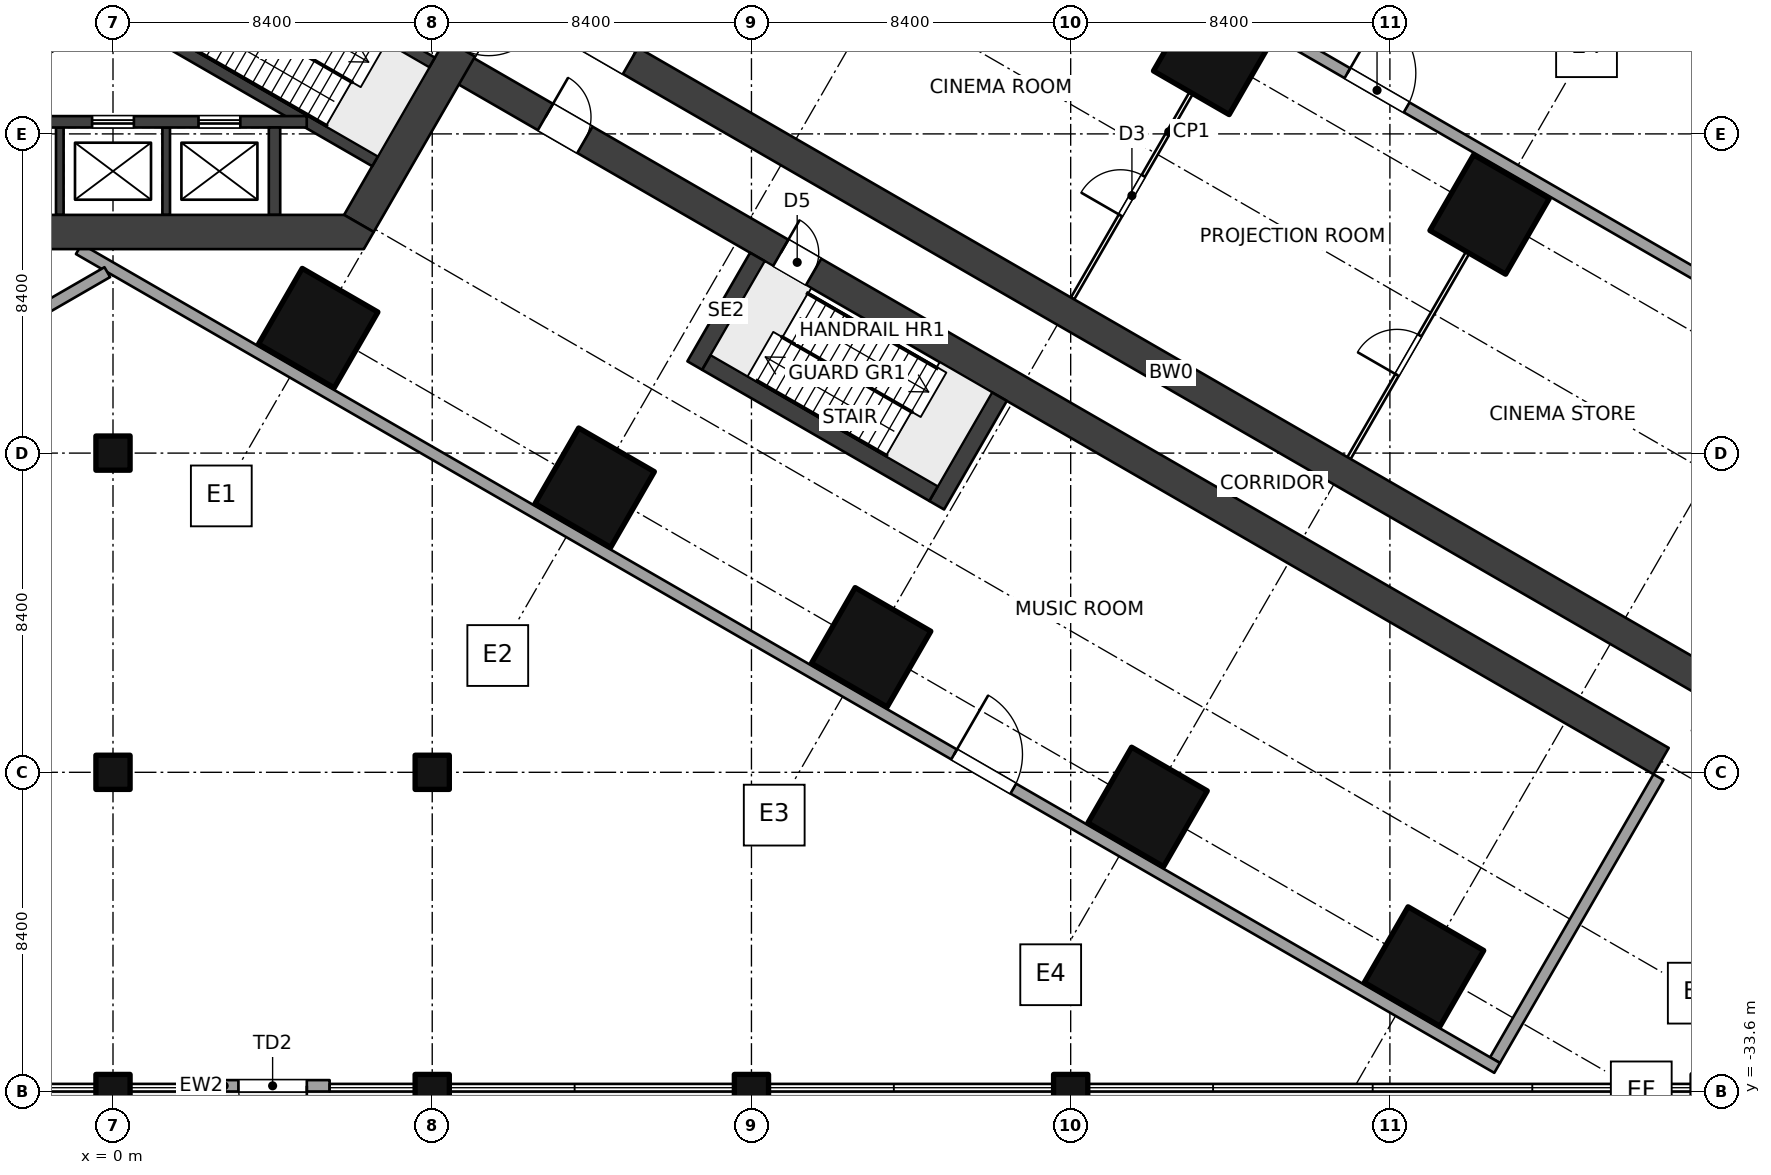
"""IFC4 building model, lengths in metres.
Left out: names, types, materials, properties, quantities, classifications, styles, units other than length and angle.
Written with IfcOpenShell. Run it as: python <this file> out.ifc"""

import sys

from ifc_helpers import new_model, si_unit, direction, frame, frame_2d, origin, origin_2d, place, context, subcontext, project, spatial, polyline, rectangle, outline, extrude, element, fill, save


model = new_model("IFC4")
c1 = context("Model", 3, precision=1e-05, world=origin(), true_north=direction((0.0, 1.0)))
c2 = subcontext(c1, "Body", "Model", "MODEL_VIEW")
j1 = project(units=[si_unit("LENGTHUNIT", "METRE"), si_unit("PLANEANGLEUNIT", "RADIAN")], contexts=[c1])
p1 = place(None, origin())
s1 = spatial("IfcSite", under=j1, at=p1, CompositionType="ELEMENT")
p2 = place(p1, origin())
s2 = spatial("IfcBuilding", under=s1, at=p2, CompositionType="ELEMENT")
p3 = place(p2, frame((0.0, 0.0, 6.0)))
s3 = spatial("IfcBuildingStorey", under=s2, at=p3, CompositionType="ELEMENT", Elevation=6.0)
for number, where, z_axis, x_axis in (
    (1, (5.4, -13.51, 0.0), (0.0, 0.0, 1.0), (-0.5, -0.866, 0.0)),
    (2, (12.675, -17.71, 0.0), (0.0, 0.0, 1.0), (-0.5, -0.866, 0.0)),
    (3, (28.949, -6.322, 0.0), (0.0, 0.0, 1.0), (-0.5, -0.866, 0.0)),
    (4, (19.949, -21.91, 0.0), (0.0, 0.0, 1.0), (-0.5, -0.866, 0.0)),
    (5, (36.224, -10.521, 0.0), (0.0, 0.0, 1.0), (-0.5, -0.866, 0.0)),
    (6, (27.224, -26.11, 0.0), (0.0, 0.0, 1.0), (-0.5, -0.866, 0.0)),
    (7, (34.499, -30.31, 0.0), (0.0, 0.0, 1.0), (-0.5, -0.866, 0.0)),
):
    element("IfcColumn", number, at=place(p3, frame(where, z_axis=z_axis, x_axis=x_axis)), inside=s3, PredefinedType="COLUMN", context=c2, shape_type="SweptSolid", body=[
        extrude(rectangle(XDim=2.3, YDim=2.3, at=origin_2d()), origin(), (0.0, 0.0, 1.0), 5.0),
    ])
for number, where, z_axis, x_axis in (
    (8, (0.0, -33.6, 0.0), (0.0, 0.0, 1.0), (1.0, 0.0, 0.0)),
    (9, (0.0, -25.2, 0.0), (0.0, 0.0, 1.0), (1.0, 0.0, 0.0)),
    (10, (0.0, -16.8, 0.0), (0.0, 0.0, 1.0), (1.0, 0.0, 0.0)),
    (11, (8.4, -33.6, 0.0), (0.0, 0.0, 1.0), (1.0, 0.0, 0.0)),
    (12, (8.4, -25.2, 0.0), (0.0, 0.0, 1.0), (1.0, 0.0, 0.0)),
    (13, (16.8, -33.6, 0.0), (0.0, 0.0, 1.0), (1.0, 0.0, 0.0)),
    (14, (25.2, -33.6, 0.0), (0.0, 0.0, 1.0), (1.0, 0.0, 0.0)),
):
    element("IfcColumn", number, at=place(p3, frame(where, z_axis=z_axis, x_axis=x_axis)), inside=s3, PredefinedType="COLUMN", context=c2, shape_type="SweptSolid", body=[
        extrude(rectangle(XDim=0.9, YDim=0.9, at=origin_2d()), origin(), (0.0, 0.0, 1.0), 5.0),
    ])
p4 = place(p3, frame((12.551, -0.225, 0.0), z_axis=(0.0, 0.0, 1.0), x_axis=(-0.499997612506, -0.8660267822, 0.0)))
e15 = element("IfcWall", 15, at=p4, inside=s3, PredefinedType="SHEAR", context=c2, shape_type="SweptSolid", body=[
    extrude(rectangle(XDim=12.161, YDim=0.9, at=frame_2d((6.08, 0.0))), origin(), (0.0, 0.0, 1.0), 5.0),
])
p5 = place(p4, frame((5.33, 0.0, 0.0)))
e16 = element("IfcOpeningElement", 16, at=p5, cuts=e15, PredefinedType="OPENING", context=c2, shape_type="SweptSolid", body=[
    extrude(rectangle(XDim=1.5, YDim=2.1, at=frame_2d((0.75, 1.05))), frame((0.0, 0.46, 0.0), z_axis=(0.0, -1.0, 0.0), x_axis=(1.0, 0.0, 0.0)), (0.0, 0.0, 1.0), 0.92),
])
p6 = place(p3, origin())
e17 = element("IfcWall", 17, at=p6, inside=s3, PredefinedType="SHEAR", context=c2, shape_type="SweptSolid", body=[
    extrude(outline(polyline([(-6.6, -11.432), (6.6, -11.432), (6.86, -10.981), (6.08, -10.531), (-6.08, -10.531), (-6.86, -10.981), (-6.6, -11.432)])), origin(), (0.0, 0.0, 1.0), 5.0),
])
p7 = place(p3, frame((-0.919, -5.669, 0.0), z_axis=(0.0, 0.0, 1.0), x_axis=(-0.866011800373, -0.500023561059, 0.0)))
e18 = element("IfcWall", 18, at=p7, inside=s3, PredefinedType="SHEAR", context=c2, shape_type="SweptSolid", body=[
    extrude(rectangle(XDim=6.902, YDim=0.3, at=frame_2d((3.451, 0.0))), origin(), (0.0, 0.0, 1.0), 5.0),
])
p8 = place(p3, frame((2.419, -3.071, 0.0), z_axis=(0.0, 0.0, 1.0), x_axis=(0.86602711848, -0.499997030048, 0.0)))
e19 = element("IfcWall", 19, at=p8, inside=s3, PredefinedType="SHEAR", context=c2, shape_type="SweptSolid", body=[
    extrude(rectangle(XDim=6.901, YDim=0.3, at=frame_2d((3.451, 0.0))), origin(), (0.0, 0.0, 1.0), 5.0),
])
p9 = place(p8, frame((0.25, 0.0, 0.0)))
e20 = element("IfcOpeningElement", 20, at=p9, cuts=e19, PredefinedType="OPENING", context=c2, shape_type="SweptSolid", body=[
    extrude(rectangle(XDim=1.0, YDim=2.1, at=frame_2d((0.5, 1.05))), frame((0.0, 0.16, 0.0), z_axis=(0.0, -1.0, 0.0), x_axis=(1.0, 0.0, 0.0)), (0.0, 0.0, 1.0), 0.32),
])
p10 = place(p3, frame((0.919, -5.669, 0.0), z_axis=(0.0, 0.0, 1.0), x_axis=(0.866011800373, -0.500023561059, 0.0)))
e21 = element("IfcWall", 21, at=p10, inside=s3, PredefinedType="SHEAR", context=c2, shape_type="SweptSolid", body=[
    extrude(rectangle(XDim=6.902, YDim=0.3, at=frame_2d((3.451, 0.0))), origin(), (0.0, 0.0, 1.0), 5.0),
])
p11 = place(p3, frame((5.098, -8.082, 0.0), z_axis=(0.0, 0.0, 1.0), x_axis=(-1.0, 0.0, 0.0)))
e22 = element("IfcWall", 22, at=p11, inside=s3, PredefinedType="SHEAR", context=c2, shape_type="SweptSolid", body=[
    extrude(rectangle(XDim=10.195, YDim=0.3, at=frame_2d((5.098, 0.0))), origin(), (0.0, 0.0, 1.0), 5.0),
])
p12 = place(p11, frame((1.748, 0.0, 0.0)))
e23 = element("IfcOpeningElement", 23, at=p12, cuts=e22, PredefinedType="OPENING", context=c2, shape_type="SweptSolid", body=[
    extrude(rectangle(XDim=1.1, YDim=2.1, at=frame_2d((0.55, 1.05))), frame((0.0, 0.16, 0.0), z_axis=(0.0, -1.0, 0.0), x_axis=(1.0, 0.0, 0.0)), (0.0, 0.0, 1.0), 0.32),
])
p13 = place(p11, frame((4.548, 0.0, 0.0)))
e24 = element("IfcOpeningElement", 24, at=p13, cuts=e22, PredefinedType="OPENING", context=c2, shape_type="SweptSolid", body=[
    extrude(rectangle(XDim=1.1, YDim=2.1, at=frame_2d((0.55, 1.05))), frame((0.0, 0.16, 0.0), z_axis=(0.0, -1.0, 0.0), x_axis=(1.0, 0.0, 0.0)), (0.0, 0.0, 1.0), 0.32),
])
p14 = place(p11, frame((7.348, 0.0, 0.0)))
e25 = element("IfcOpeningElement", 25, at=p14, cuts=e22, PredefinedType="OPENING", context=c2, shape_type="SweptSolid", body=[
    extrude(rectangle(XDim=1.1, YDim=2.1, at=frame_2d((0.55, 1.05))), frame((0.0, 0.16, 0.0), z_axis=(0.0, -1.0, 0.0), x_axis=(1.0, 0.0, 0.0)), (0.0, 0.0, 1.0), 0.32),
])
p15 = place(p3, frame((4.25, -8.231, 0.0), z_axis=(0.0, 0.0, 1.0), x_axis=(0.0, -1.0, 0.0)))
e26 = element("IfcWall", 26, at=p15, inside=s3, PredefinedType="SHEAR", context=c2, shape_type="SweptSolid", body=[
    extrude(rectangle(XDim=2.3, YDim=0.3, at=frame_2d((1.15, 0.0))), origin(), (0.0, 0.0, 1.0), 5.0),
])
for number, where, z_axis, x_axis in (
    (27, (1.4, -8.231, 0.0), (0.0, 0.0, 1.0), (0.0, -1.0, 0.0)),
    (28, (-1.4, -8.231, 0.0), (0.0, 0.0, 1.0), (0.0, -1.0, 0.0)),
):
    element("IfcWall", number, at=place(p3, frame(where, z_axis=z_axis, x_axis=x_axis)), inside=s3, PredefinedType="SHEAR", context=c2, shape_type="SweptSolid", body=[
        extrude(rectangle(XDim=2.3, YDim=0.2, at=frame_2d((1.15, 0.0))), origin(), (0.0, 0.0, 1.0), 5.0),
    ])
p16 = place(p3, frame((10.11, -4.451, 0.0), z_axis=(0.0, 0.0, 1.0), x_axis=(0.866025284237, -0.500000207062, 0.0)))
e29 = element("IfcWall", 29, at=p16, inside=s3, PredefinedType="SHEAR", context=c2, shape_type="SweptSolid", body=[
    extrude(rectangle(XDim=36.75, YDim=0.8, at=frame_2d((18.375, 0.0))), origin(), (0.0, 0.0, 1.0), 5.0),
])
p17 = place(p16, frame((2.85, 0.0, 0.0)))
e30 = element("IfcOpeningElement", 30, at=p17, cuts=e29, PredefinedType="OPENING", context=c2, shape_type="SweptSolid", body=[
    extrude(rectangle(XDim=1.2, YDim=2.1, at=frame_2d((0.6, 1.05))), frame((0.0, 0.41, 0.0), z_axis=(0.0, -1.0, 0.0), x_axis=(1.0, 0.0, 0.0)), (0.0, 0.0, 1.0), 0.82),
])
p18 = place(p3, frame((8.91, -6.53, 0.0), z_axis=(0.0, 0.0, 1.0), x_axis=(0.866025284237, -0.500000207062, 0.0)))
e31 = element("IfcWall", 31, at=p18, inside=s3, PredefinedType="SHEAR", context=c2, shape_type="SweptSolid", body=[
    extrude(rectangle(XDim=36.75, YDim=0.8, at=frame_2d((18.375, 0.0))), origin(), (0.0, 0.0, 1.0), 5.0),
])
p19 = place(p18, frame((10.0, 0.0, 0.0)))
e32 = element("IfcOpeningElement", 32, at=p19, cuts=e31, PredefinedType="OPENING", context=c2, shape_type="SweptSolid", body=[
    extrude(rectangle(XDim=1.0, YDim=2.1, at=frame_2d((0.5, 1.05))), frame((0.0, 0.41, 0.0), z_axis=(0.0, -1.0, 0.0), x_axis=(1.0, 0.0, 0.0)), (0.0, 0.0, 1.0), 0.82),
])
p20 = place(p18, frame((2.85, 0.0, 0.0)))
e33 = element("IfcOpeningElement", 33, at=p20, cuts=e31, PredefinedType="OPENING", context=c2, shape_type="SweptSolid", body=[
    extrude(rectangle(XDim=1.2, YDim=2.1, at=frame_2d((0.6, 1.05))), frame((0.0, 0.41, 0.0), z_axis=(0.0, -1.0, 0.0), x_axis=(1.0, 0.0, 0.0)), (0.0, 0.0, 1.0), 0.82),
])
p21 = place(p3, frame((5.7, -33.45, 0.0), z_axis=(0.0, 0.0, 1.0), x_axis=(-1.0, 0.0, 0.0)))
e34 = element("IfcWall", 34, at=p21, inside=s3, PredefinedType="SOLIDWALL", context=c2, shape_type="SweptSolid", body=[
    extrude(rectangle(XDim=3.0, YDim=0.3, at=frame_2d((1.5, 0.0))), origin(), (0.0, 0.0, 1.0), 3.7),
])
p22 = place(p21, frame((0.6, 0.0, 0.0)))
e35 = element("IfcOpeningElement", 35, at=p22, cuts=e34, PredefinedType="OPENING", context=c2, shape_type="SweptSolid", body=[
    extrude(rectangle(XDim=1.8, YDim=2.4, at=frame_2d((0.9, 1.2))), frame((0.0, 0.16, 0.0), z_axis=(0.0, -1.0, 0.0), x_axis=(1.0, 0.0, 0.0)), (0.0, 0.0, 1.0), 0.32),
])
p23 = place(p3, frame((25.249, -12.73, 0.0), z_axis=(0.0, 0.0, 1.0), x_axis=(0.499987320047, 0.866032724435, 0.0)))
e36 = element("IfcWall", 36, at=p23, inside=s3, PredefinedType="PARTITIONING", context=c2, shape_type="SweptSolid", body=[
    extrude(rectangle(XDim=6.25, YDim=0.1, at=frame_2d((3.125, 0.0))), origin(), (0.0, 0.0, 1.0), 2.9),
])
p24 = place(p23, frame((2.525, 0.0, 0.0)))
e37 = element("IfcOpeningElement", 37, at=p24, cuts=e36, PredefinedType="OPENING", context=c2, shape_type="SweptSolid", body=[
    extrude(rectangle(XDim=1.2, YDim=2.1, at=frame_2d((0.6, 1.05))), frame((0.0, 0.06, 0.0), z_axis=(0.0, -1.0, 0.0), x_axis=(1.0, 0.0, 0.0)), (0.0, 0.0, 1.0), 0.12),
])
p25 = place(p3, frame((32.524, -16.93, 0.0), z_axis=(0.0, 0.0, 1.0), x_axis=(0.500004234368, 0.866022959057, 0.0)))
e38 = element("IfcWall", 38, at=p25, inside=s3, PredefinedType="PARTITIONING", context=c2, shape_type="SweptSolid", body=[
    extrude(rectangle(XDim=6.25, YDim=0.1, at=frame_2d((3.125, 0.0))), origin(), (0.0, 0.0, 1.0), 2.9),
])
p26 = place(p25, frame((2.525, 0.0, 0.0)))
e39 = element("IfcOpeningElement", 39, at=p26, cuts=e38, PredefinedType="OPENING", context=c2, shape_type="SweptSolid", body=[
    extrude(rectangle(XDim=1.2, YDim=2.1, at=frame_2d((0.6, 1.05))), frame((0.0, 0.06, 0.0), z_axis=(0.0, -1.0, 0.0), x_axis=(1.0, 0.0, 0.0)), (0.0, 0.0, 1.0), 0.12),
])
p27 = place(p3, frame((40.667, -25.326, 0.0), z_axis=(0.0, 0.0, 1.0), x_axis=(-0.500007509209, -0.866021068297, 0.0)))
e40 = element("IfcWall", 40, at=p27, inside=s3, PredefinedType="SOLIDWALL", context=c2, shape_type="SweptSolid", body=[
    extrude(rectangle(XDim=8.6, YDim=0.3, at=frame_2d((4.3, 0.0))), origin(), (0.0, 0.0, 1.0), 3.1),
])
p28 = place(p3, frame((-0.15, -12.038, 0.0), z_axis=(0.0, 0.0, 1.0), x_axis=(-0.866026292622, -0.499998460486, 0.0)))
e41 = element("IfcWall", 41, at=p28, inside=s3, PredefinedType="SOLIDWALL", context=c2, shape_type="SweptSolid", body=[
    extrude(rectangle(XDim=41.883, YDim=0.3, at=frame_2d((20.941, 0.0))), origin(), (0.0, 0.0, 1.0), 4.7),
])
p29 = place(p28, frame((25.383, 0.0, 0.0)))
e42 = element("IfcOpeningElement", 42, at=p29, cuts=e41, PredefinedType="OPENING", context=c2, shape_type="SweptSolid", body=[
    extrude(rectangle(XDim=1.8, YDim=2.4, at=frame_2d((0.9, 1.2))), frame((0.0, 0.16, 0.0), z_axis=(0.0, -1.0, 0.0), x_axis=(1.0, 0.0, 0.0)), (0.0, 0.0, 1.0), 0.32),
])
p30 = place(p3, frame((9.45, 6.495, 0.0), z_axis=(0.0, 0.0, 1.0), x_axis=(0.866025301493, -0.500000177174, 0.0)))
e43 = element("IfcWall", 43, at=p30, inside=s3, PredefinedType="SOLIDWALL", context=c2, shape_type="SweptSolid", body=[
    extrude(rectangle(XDim=43.095, YDim=0.3, at=frame_2d((21.548, 0.0))), origin(), (0.0, 0.0, 1.0), 4.7),
])
p31 = place(p30, frame((26.595, 0.0, 0.0)))
e44 = element("IfcOpeningElement", 44, at=p31, cuts=e43, PredefinedType="OPENING", context=c2, shape_type="SweptSolid", body=[
    extrude(rectangle(XDim=1.8, YDim=2.4, at=frame_2d((0.9, 1.2))), frame((0.0, 0.16, 0.0), z_axis=(0.0, -1.0, 0.0), x_axis=(1.0, 0.0, 0.0)), (0.0, 0.0, 1.0), 0.32),
])
p32 = place(p3, frame((-0.9, -11.432, 0.0), z_axis=(0.0, 0.0, 1.0), x_axis=(0.866025301493, -0.500000177174, 0.0)))
e45 = element("IfcWall", 45, at=p32, inside=s3, PredefinedType="SOLIDWALL", context=c2, shape_type="SweptSolid", body=[
    extrude(rectangle(XDim=43.095, YDim=0.3, at=frame_2d((21.548, 0.0))), origin(), (0.0, 0.0, 1.0), 4.7),
])
p33 = place(p32, frame((26.595, 0.0, 0.0)))
e46 = element("IfcOpeningElement", 46, at=p33, cuts=e45, PredefinedType="OPENING", context=c2, shape_type="SweptSolid", body=[
    extrude(rectangle(XDim=1.8, YDim=2.4, at=frame_2d((0.9, 1.2))), frame((0.0, 0.16, 0.0), z_axis=(0.0, -1.0, 0.0), x_axis=(1.0, 0.0, 0.0)), (0.0, 0.0, 1.0), 0.32),
])
for number, where, z_axis, x_axis in (
    (47, (16.959, -11.639, 0.0), (0.0, 0.0, 1.0), (-0.5, -0.866, 0.0)),
    (48, (23.324, -15.314, 0.0), (0.0, 0.0, 1.0), (-0.5, -0.866, 0.0)),
):
    element("IfcWall", number, at=place(p3, frame(where, z_axis=z_axis, x_axis=x_axis)), inside=s3, PredefinedType="SOLIDWALL", context=c2, shape_type="SweptSolid", body=[
        extrude(rectangle(XDim=3.3, YDim=0.45, at=frame_2d((1.65, 0.0))), origin(), (0.0, 0.0, 1.0), 5.0),
    ])
p34 = place(p3, frame((15.616, -14.415, 0.0), z_axis=(0.0, 0.0, 1.0), x_axis=(0.866028853923, -0.499994024137, 0.0)))
e49 = element("IfcWall", 49, at=p34, inside=s3, PredefinedType="SOLIDWALL", context=c2, shape_type="SweptSolid", body=[
    extrude(rectangle(XDim=6.9, YDim=0.45, at=frame_2d((3.45, 0.0))), origin(), (0.0, 0.0, 1.0), 5.0),
])
p35 = place(p22, origin())
e50 = element("IfcDoor", 50, at=p35, inside=s3, OperationType="DOUBLE_DOOR_SINGLE_SWING", PredefinedType="DOOR", context=c2, shape_type="SweptSolid", body=[
    extrude(rectangle(XDim=1.8, YDim=2.4, at=frame_2d((0.9, 1.2))), frame((0.0, 0.025, 0.0), z_axis=(0.0, -1.0, 0.0), x_axis=(1.0, 0.0, 0.0)), (0.0, 0.0, 1.0), 0.05),
])
fill(e35, e50)
p36 = place(p12, origin())
e51 = element("IfcDoor", 51, at=p36, inside=s3, OperationType="DOUBLE_DOOR_SLIDING", PredefinedType="DOOR", context=c2, shape_type="SweptSolid", body=[
    extrude(rectangle(XDim=1.1, YDim=2.1, at=frame_2d((0.55, 1.05))), frame((0.0, 0.025, 0.0), z_axis=(0.0, -1.0, 0.0), x_axis=(1.0, 0.0, 0.0)), (0.0, 0.0, 1.0), 0.05),
])
fill(e23, e51)
p37 = place(p13, origin())
e52 = element("IfcDoor", 52, at=p37, inside=s3, OperationType="DOUBLE_DOOR_SLIDING", PredefinedType="DOOR", context=c2, shape_type="SweptSolid", body=[
    extrude(rectangle(XDim=1.1, YDim=2.1, at=frame_2d((0.55, 1.05))), frame((0.0, 0.025, 0.0), z_axis=(0.0, -1.0, 0.0), x_axis=(1.0, 0.0, 0.0)), (0.0, 0.0, 1.0), 0.05),
])
fill(e24, e52)
p38 = place(p19, origin())
e53 = element("IfcDoor", 53, at=p38, inside=s3, OperationType="SINGLE_SWING_LEFT", PredefinedType="DOOR", context=c2, shape_type="SweptSolid", body=[
    extrude(rectangle(XDim=1.0, YDim=2.1, at=frame_2d((0.5, 1.05))), frame((0.0, 0.025, 0.0), z_axis=(0.0, -1.0, 0.0), x_axis=(1.0, 0.0, 0.0)), (0.0, 0.0, 1.0), 0.05),
])
fill(e32, e53)
p39 = place(p24, origin())
e54 = element("IfcDoor", 54, at=p39, inside=s3, OperationType="DOUBLE_SWING_LEFT", PredefinedType="DOOR", context=c2, shape_type="SweptSolid", body=[
    extrude(rectangle(XDim=1.2, YDim=2.1, at=frame_2d((0.6, 1.05))), frame((0.0, 0.025, 0.0), z_axis=(0.0, -1.0, 0.0), x_axis=(1.0, 0.0, 0.0)), (0.0, 0.0, 1.0), 0.05),
])
fill(e37, e54)
p40 = place(p26, origin())
e55 = element("IfcDoor", 55, at=p40, inside=s3, OperationType="DOUBLE_SWING_LEFT", PredefinedType="DOOR", context=c2, shape_type="SweptSolid", body=[
    extrude(rectangle(XDim=1.2, YDim=2.1, at=frame_2d((0.6, 1.05))), frame((0.0, 0.025, 0.0), z_axis=(0.0, -1.0, 0.0), x_axis=(1.0, 0.0, 0.0)), (0.0, 0.0, 1.0), 0.05),
])
fill(e39, e55)
p41 = place(p17, origin())
e56 = element("IfcDoor", 56, at=p41, inside=s3, OperationType="DOUBLE_SWING_LEFT", PredefinedType="DOOR", context=c2, shape_type="SweptSolid", body=[
    extrude(rectangle(XDim=1.2, YDim=2.1, at=frame_2d((0.6, 1.05))), frame((0.0, 0.025, 0.0), z_axis=(0.0, -1.0, 0.0), x_axis=(1.0, 0.0, 0.0)), (0.0, 0.0, 1.0), 0.05),
])
fill(e30, e56)
p42 = place(p20, origin())
e57 = element("IfcDoor", 57, at=p42, inside=s3, OperationType="DOUBLE_SWING_LEFT", PredefinedType="DOOR", context=c2, shape_type="SweptSolid", body=[
    extrude(rectangle(XDim=1.2, YDim=2.1, at=frame_2d((0.6, 1.05))), frame((0.0, 0.025, 0.0), z_axis=(0.0, -1.0, 0.0), x_axis=(1.0, 0.0, 0.0)), (0.0, 0.0, 1.0), 0.05),
])
fill(e33, e57)
p43 = place(p31, origin())
e58 = element("IfcDoor", 58, at=p43, inside=s3, OperationType="DOUBLE_DOOR_DOUBLE_SWING", PredefinedType="DOOR", context=c2, shape_type="SweptSolid", body=[
    extrude(rectangle(XDim=1.8, YDim=2.4, at=frame_2d((0.9, 1.2))), frame((0.0, 0.025, 0.0), z_axis=(0.0, -1.0, 0.0), x_axis=(1.0, 0.0, 0.0)), (0.0, 0.0, 1.0), 0.05),
])
fill(e44, e58)
p44 = place(p33, origin())
e59 = element("IfcDoor", 59, at=p44, inside=s3, OperationType="DOUBLE_DOOR_DOUBLE_SWING", PredefinedType="DOOR", context=c2, shape_type="SweptSolid", body=[
    extrude(rectangle(XDim=1.8, YDim=2.4, at=frame_2d((0.9, 1.2))), frame((0.0, 0.025, 0.0), z_axis=(0.0, -1.0, 0.0), x_axis=(1.0, 0.0, 0.0)), (0.0, 0.0, 1.0), 0.05),
])
fill(e46, e59)
save(model, sys.argv[1])
